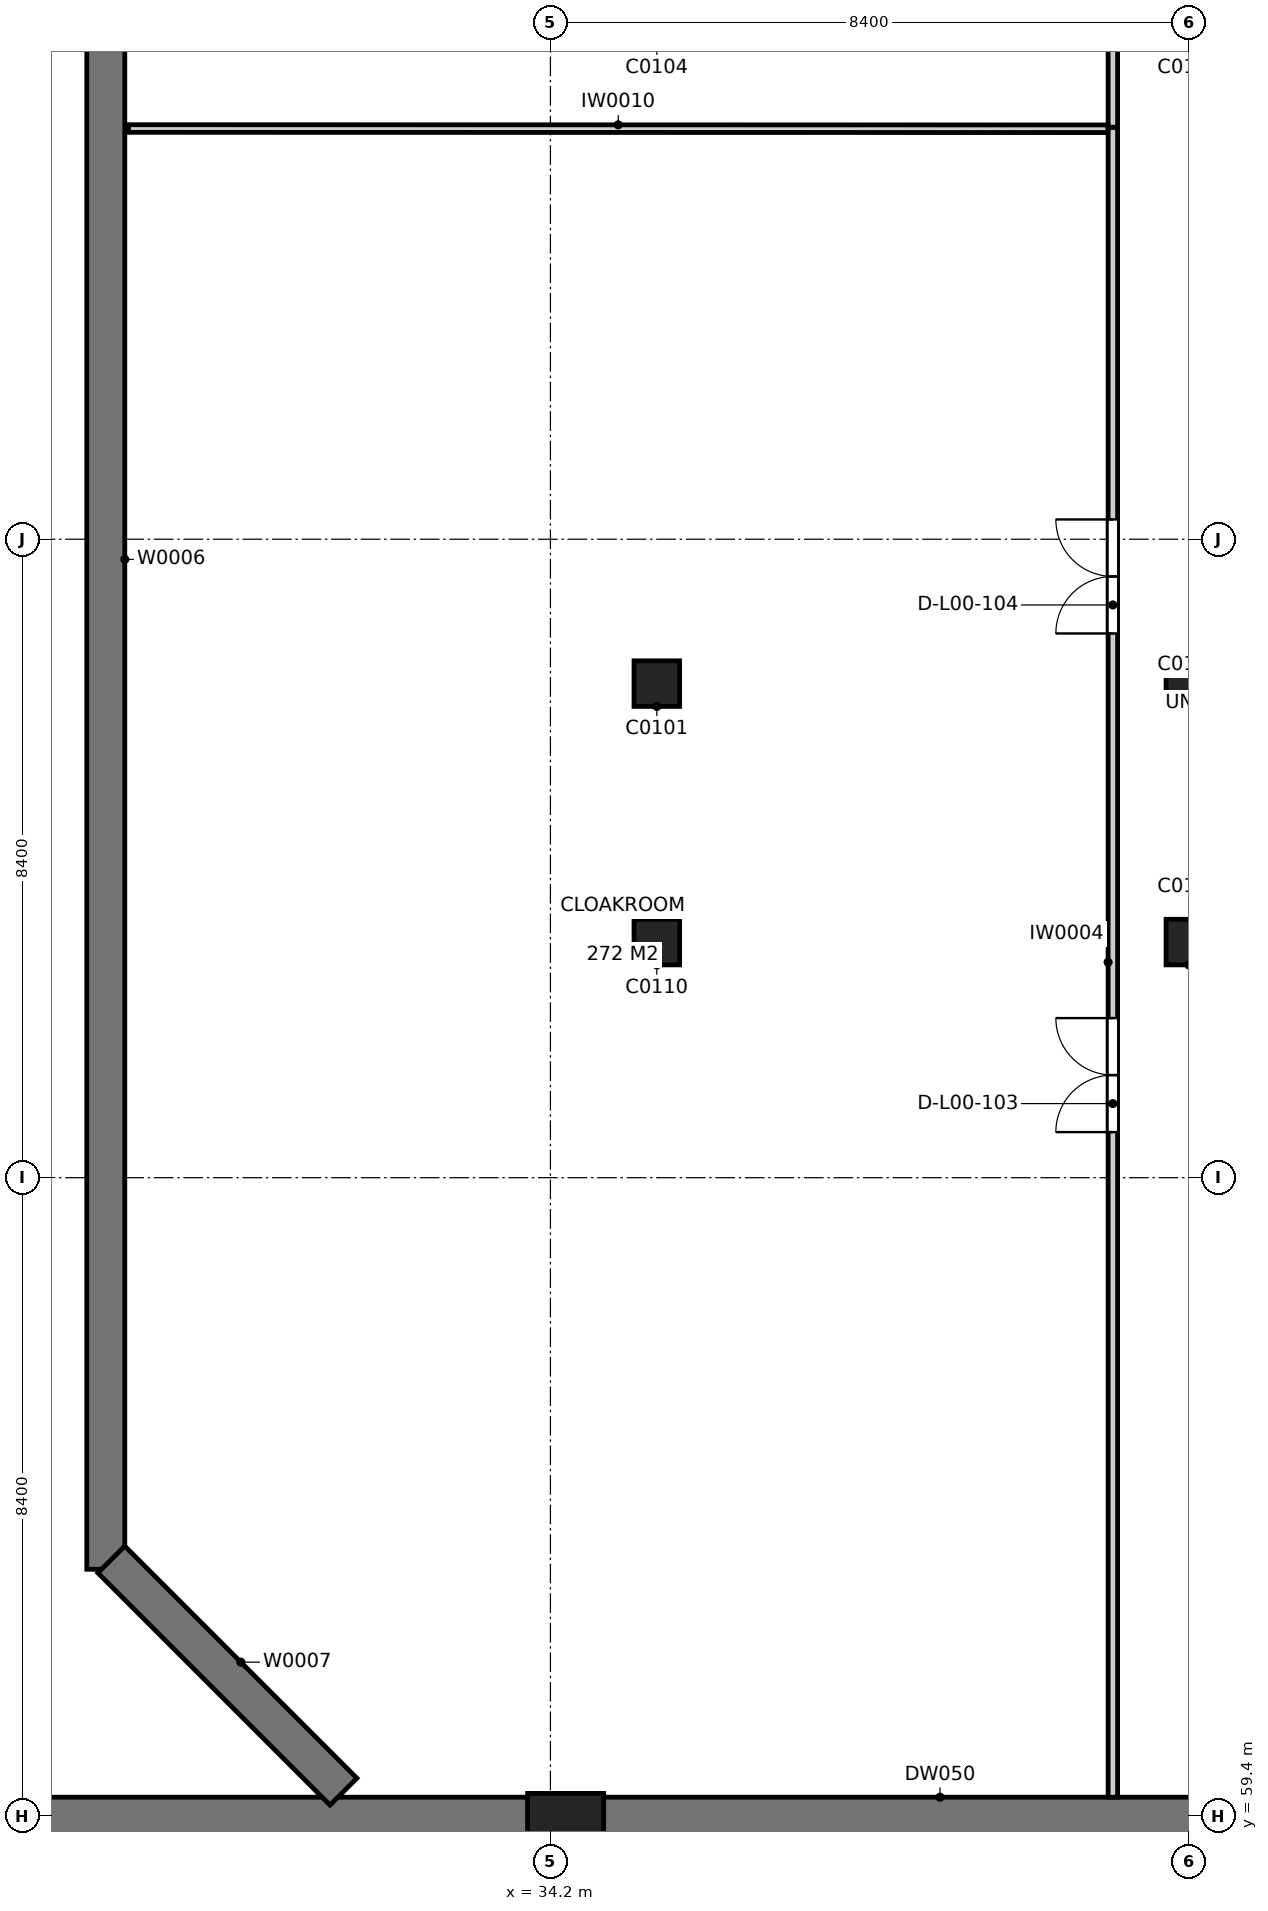
"""IFC4 building model, lengths in metres.
Left out: names, types, materials, properties, quantities, classifications, styles, units other than length and angle.
Written with IfcOpenShell. Run it as: python <this file> out.ifc"""

import sys

from ifc_helpers import new_model, si_unit, direction, frame, frame_2d, origin, origin_2d, place, context, subcontext, project, spatial, rectangle, extrude, element, fill, save


model = new_model("IFC4")
c1 = context("Model", 3, precision=1e-05, world=origin(), true_north=direction((0.0, 1.0)))
c2 = subcontext(c1, "Body", "Model", "MODEL_VIEW")
j1 = project(units=[si_unit("LENGTHUNIT", "METRE"), si_unit("PLANEANGLEUNIT", "RADIAN")], contexts=[c1])
p1 = place(None, origin())
s1 = spatial("IfcSite", under=j1, at=p1, CompositionType="ELEMENT")
p2 = place(p1, origin())
s2 = spatial("IfcBuilding", under=s1, at=p2, CompositionType="ELEMENT")
p3 = place(p2, origin())
s3 = spatial("IfcBuildingStorey", under=s2, at=p3, CompositionType="ELEMENT", Elevation=0.0)
p4 = place(p3, frame((26.153, 59.4, 0.0), z_axis=(0.0, 0.0, 1.0), x_axis=(1.0, 0.0, 0.0)))
e1 = element("IfcWall", 1, at=p4, inside=s3, PredefinedType="SOLIDWALL", context=c2, shape_type="SweptSolid", body=[
    extrude(rectangle(XDim=32.894, YDim=0.5, at=frame_2d((16.447, 0.0))), origin(), (0.0, 0.0, 1.0), 4.8),
])
p5 = place(p3, frame((34.4, 59.2, 0.0), z_axis=(0.0, 0.0, 1.0), x_axis=(1.0, 0.0, 0.0)))
e2 = element("IfcColumn", 2, at=p5, inside=s3, PredefinedType="COLUMN", context=c2, shape_type="SweptSolid", body=[
    extrude(rectangle(XDim=1.0, YDim=1.0, at=origin_2d()), origin(), (0.0, 0.0, 1.0), 4.8),
])
for number, where, z_axis, x_axis in (
    (3, (35.6, 74.3, 0.0), (0.0, 0.0, 1.0), (1.0, 0.0, 0.0)),
    (4, (42.6, 74.3, 0.0), (0.0, 0.0, 1.0), (1.0, 0.0, 0.0)),
):
    element("IfcColumn", number, at=place(p3, frame(where, z_axis=z_axis, x_axis=x_axis)), inside=s3, PredefinedType="COLUMN", context=c2, shape_type="SweptSolid", body=[
        extrude(rectangle(XDim=0.6, YDim=0.6, at=origin_2d()), origin(), (0.0, 0.0, 1.0), 2.78),
    ])
for number, where, z_axis, x_axis in (
    (5, (35.6, 70.9, 0.0), (0.0, 0.0, 1.0), (1.0, 0.0, 0.0)),
    (6, (42.6, 70.9, 0.0), (0.0, 0.0, 1.0), (1.0, 0.0, 0.0)),
):
    element("IfcColumn", number, at=place(p3, frame(where, z_axis=z_axis, x_axis=x_axis)), inside=s3, PredefinedType="COLUMN", context=c2, shape_type="SweptSolid", body=[
        extrude(rectangle(XDim=0.6, YDim=0.6, at=origin_2d()), origin(), (0.0, 0.0, 1.0), 4.05),
    ])
p6 = place(p3, frame((28.35, 100.8, 0.0), z_axis=(0.0, 0.0, 1.0), x_axis=(0.0, -1.0, 0.0)))
e7 = element("IfcWall", 7, at=p6, inside=s3, PredefinedType="SOLIDWALL", context=c2, shape_type="SweptSolid", body=[
    extrude(rectangle(XDim=38.151, YDim=0.5, at=frame_2d((19.076, 0.0))), origin(), (0.0, 0.0, 1.0), 4.8),
])
p7 = place(p3, frame((28.423, 62.777, 0.0), z_axis=(0.0, 0.0, 1.0), x_axis=(0.707106781187, -0.707106781187, 0.0)))
e8 = element("IfcWall", 8, at=p7, inside=s3, PredefinedType="SOLIDWALL", context=c2, shape_type="SweptSolid", body=[
    extrude(rectangle(XDim=4.32, YDim=0.5, at=frame_2d((2.16, 0.0))), origin(), (0.0, 0.0, 1.0), 4.8),
])
p8 = place(p3, frame((41.6, 59.65, 0.0), z_axis=(0.0, 0.0, 1.0), x_axis=(0.0, 1.0, 0.0)))
e9 = element("IfcWall", 9, at=p8, inside=s3, PredefinedType="PARTITIONING", context=c2, shape_type="SweptSolid", body=[
    extrude(rectangle(XDim=21.97, YDim=0.125, at=frame_2d((10.985, 0.0))), origin(), (0.0, 0.0, 1.0), 2.78),
])
p9 = place(p8, frame((8.75, 0.0, 0.0)))
e10 = element("IfcOpeningElement", 10, at=p9, cuts=e9, PredefinedType="OPENING", context=c2, shape_type="SweptSolid", body=[
    extrude(rectangle(XDim=1.5, YDim=2.1, at=frame_2d((0.75, 1.05))), frame((0.0, 0.073, 0.0), z_axis=(0.0, -1.0, 0.0), x_axis=(1.0, 0.0, 0.0)), (0.0, 0.0, 1.0), 0.145),
])
p10 = place(p8, frame((15.31, 0.0, 0.0)))
e11 = element("IfcOpeningElement", 11, at=p10, cuts=e9, PredefinedType="OPENING", context=c2, shape_type="SweptSolid", body=[
    extrude(rectangle(XDim=1.5, YDim=2.1, at=frame_2d((0.75, 1.05))), frame((0.0, 0.073, 0.0), z_axis=(0.0, -1.0, 0.0), x_axis=(1.0, 0.0, 0.0)), (0.0, 0.0, 1.0), 0.145),
])
p11 = place(p3, frame((41.6, 81.62, 0.0), z_axis=(0.0, 0.0, 1.0), x_axis=(0.0, 1.0, 0.0)))
e12 = element("IfcWall", 12, at=p11, inside=s3, PredefinedType="PARTITIONING", context=c2, shape_type="SweptSolid", body=[
    extrude(rectangle(XDim=8.0, YDim=0.125, at=frame_2d((4.0, 0.0))), origin(), (0.0, 0.0, 1.0), 3.6),
])
p12 = place(p11, frame((3.23, 0.0, 0.0)))
e13 = element("IfcOpeningElement", 13, at=p12, cuts=e12, PredefinedType="OPENING", context=c2, shape_type="SweptSolid", body=[
    extrude(rectangle(XDim=1.5, YDim=2.1, at=frame_2d((0.75, 1.05))), frame((0.0, 0.073, 0.0), z_axis=(0.0, -1.0, 0.0), x_axis=(1.0, 0.0, 0.0)), (0.0, 0.0, 1.0), 0.145),
])
p13 = place(p3, frame((28.65, 81.603, 0.0), z_axis=(0.0, 0.0, 1.0), x_axis=(0.999999974151, -0.000227371766, 0.0)))
e14 = element("IfcWall", 14, at=p13, inside=s3, PredefinedType="PARTITIONING", context=c2, shape_type="SweptSolid", body=[
    extrude(rectangle(XDim=12.885, YDim=0.1, at=frame_2d((6.442, 0.0))), origin(), (0.0, 0.0, 1.0), 3.6),
])
p14 = place(p9, origin())
e15 = element("IfcDoor", 15, at=p14, inside=s3, OperationType="DOUBLE_DOOR_SINGLE_SWING", PredefinedType="DOOR", context=c2, shape_type="SweptSolid", body=[
    extrude(rectangle(XDim=1.5, YDim=2.1, at=frame_2d((0.75, 1.05))), frame((0.0, 0.025, 0.0), z_axis=(0.0, -1.0, 0.0), x_axis=(1.0, 0.0, 0.0)), (0.0, 0.0, 1.0), 0.05),
])
fill(e10, e15)
p15 = place(p10, origin())
e16 = element("IfcDoor", 16, at=p15, inside=s3, OperationType="DOUBLE_DOOR_SINGLE_SWING", PredefinedType="DOOR", context=c2, shape_type="SweptSolid", body=[
    extrude(rectangle(XDim=1.5, YDim=2.1, at=frame_2d((0.75, 1.05))), frame((0.0, 0.025, 0.0), z_axis=(0.0, -1.0, 0.0), x_axis=(1.0, 0.0, 0.0)), (0.0, 0.0, 1.0), 0.05),
])
fill(e11, e16)
save(model, sys.argv[1])
